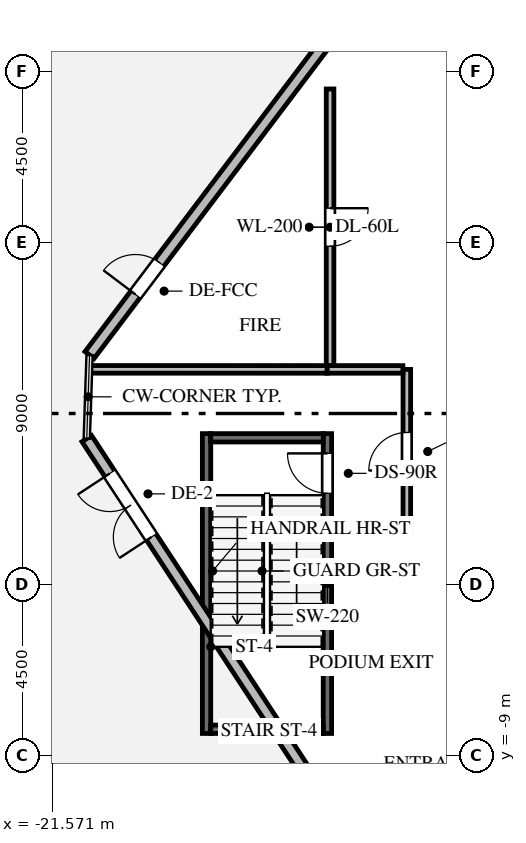
"""IFC4 building model, lengths in metres.
Left out: names, types, materials, properties, quantities, classifications, styles, units other than length and angle.
Written with IfcOpenShell. Run it as: python <this file> out.ifc"""

import sys

from ifc_helpers import new_model, si_unit, direction, frame, frame_2d, origin, place, context, subcontext, project, spatial, rectangle, extrude, source, transform, mapped, element, fill, save


model = new_model("IFC4")
c1 = context("Model", 3, precision=1e-05, world=origin(), true_north=direction((0.0, 1.0)))
c2 = subcontext(c1, "Body", "Model", "MODEL_VIEW")
j1 = project(units=[si_unit("LENGTHUNIT", "METRE"), si_unit("PLANEANGLEUNIT", "RADIAN")], contexts=[c1])
p1 = place(None, origin())
s1 = spatial("IfcSite", under=j1, at=p1, CompositionType="ELEMENT")
p2 = place(p1, origin())
s2 = spatial("IfcBuilding", under=s1, at=p2, CompositionType="ELEMENT")
p3 = place(p2, origin())
s3 = spatial("IfcBuildingStorey", under=s2, at=p3, CompositionType="ELEMENT", Elevation=0.0)
p4 = place(p3, frame((-14.33, -8.42, -0.3), z_axis=(0.0, 0.0, 1.0), x_axis=(0.0, 1.0, 0.0)))
e1 = element("IfcWall", 1, at=p4, inside=s3, PredefinedType="SHEAR", context=c2, shape_type="SweptSolid", body=[
    extrude(rectangle(XDim=7.89, YDim=0.22, at=frame_2d((3.945, 0.0))), origin(), (0.0, 0.0, 1.0), 5.2),
])
p5 = place(p4, frame((6.32, 0.0, 0.0)))
e2 = element("IfcOpeningElement", 2, at=p5, cuts=e1, PredefinedType="OPENING", context=c2, shape_type="SweptSolid", body=[
    extrude(rectangle(XDim=1.05, YDim=2.15, at=frame_2d((0.525, 1.075))), frame((0.0, 0.12, 0.0), z_axis=(0.0, -1.0, 0.0), x_axis=(1.0, 0.0, 0.0)), (0.0, 0.0, 1.0), 0.24),
])
p6 = place(p3, frame((-17.51, -0.53, -0.3), z_axis=(0.0, 0.0, 1.0), x_axis=(0.0, -1.0, 0.0)))
e3 = element("IfcWall", 3, at=p6, inside=s3, PredefinedType="SHEAR", context=c2, shape_type="SweptSolid", body=[
    extrude(rectangle(XDim=7.89, YDim=0.22, at=frame_2d((3.945, 0.0))), origin(), (0.0, 0.0, 1.0), 5.2),
])
for number, where, z_axis, x_axis in (
    (4, (-17.4, -8.31, -0.3), (0.0, 0.0, 1.0), (1.0, 0.0, 0.0)),
    (5, (-14.44, -0.64, -0.3), (0.0, 0.0, 1.0), (-1.0, 0.0, 0.0)),
):
    element("IfcWall", number, at=place(p3, frame(where, z_axis=z_axis, x_axis=x_axis)), inside=s3, PredefinedType="SHEAR", context=c2, shape_type="SweptSolid", body=[
        extrude(rectangle(XDim=2.96, YDim=0.22, at=frame_2d((1.48, 0.0))), origin(), (0.0, 0.0, 1.0), 5.2),
    ])
p7 = place(p3, frame((-20.589, 1.538, 0.0), z_axis=(0.0, 0.0, 1.0), x_axis=(0.603015201292, 0.797729695455, 0.0)))
e6 = element("IfcWall", 6, at=p7, inside=s3, PredefinedType="SOLIDWALL", context=c2, shape_type="SweptSolid", body=[
    extrude(rectangle(XDim=16.65, YDim=0.3, at=frame_2d((8.325, 0.0))), origin(), (0.0, 0.0, 1.0), 4.9),
])
p8 = place(p7, frame((2.0, 0.0, 0.0)))
e7 = element("IfcOpeningElement", 7, at=p8, cuts=e6, PredefinedType="OPENING", context=c2, shape_type="SweptSolid", body=[
    extrude(rectangle(XDim=1.05, YDim=2.2, at=frame_2d((0.525, 1.1))), frame((0.0, 0.16, 0.0), z_axis=(0.0, -1.0, 0.0), x_axis=(1.0, 0.0, 0.0)), (0.0, 0.0, 1.0), 0.32),
])
p9 = place(p3, frame((-11.422, -14.754, 0.0), z_axis=(0.0, 0.0, 1.0), x_axis=(-0.548298501614, 0.836282699288, 0.0)))
e8 = element("IfcWall", 8, at=p9, inside=s3, PredefinedType="SOLIDWALL", context=c2, shape_type="SweptSolid", body=[
    extrude(rectangle(XDim=16.853, YDim=0.3, at=frame_2d((8.426, 0.0))), origin(), (0.0, 0.0, 1.0), 4.9),
])
p10 = place(p9, frame((13.753, 0.0, 0.0)))
e9 = element("IfcOpeningElement", 9, at=p10, cuts=e8, PredefinedType="OPENING", context=c2, shape_type="SweptSolid", body=[
    extrude(rectangle(XDim=2.0, YDim=2.3, at=frame_2d((1.0, 1.15))), frame((0.0, 0.16, 0.0), z_axis=(0.0, -1.0, 0.0), x_axis=(1.0, 0.0, 0.0)), (0.0, 0.0, 1.0), 0.32),
])
p11 = place(p3, frame((-12.24, -3.16, 0.0), z_axis=(0.0, 0.0, 1.0), x_axis=(0.0, 1.0, 0.0)))
e10 = element("IfcWall", 10, at=p11, inside=s3, PredefinedType="SOLIDWALL", context=c2, shape_type="SweptSolid", body=[
    extrude(rectangle(XDim=4.32, YDim=0.2, at=frame_2d((2.16, 0.0))), origin(), (0.0, 0.0, 1.0), 4.885),
])
p12 = place(p11, frame((1.66, 0.0, 0.0)))
e11 = element("IfcOpeningElement", 11, at=p12, cuts=e10, PredefinedType="OPENING", context=c2, shape_type="SweptSolid", body=[
    extrude(rectangle(XDim=1.0, YDim=2.15, at=frame_2d((0.5, 1.075))), frame((0.0, 0.11, 0.0), z_axis=(0.0, -1.0, 0.0), x_axis=(1.0, 0.0, 0.0)), (0.0, 0.0, 1.0), 0.22),
])
p13 = place(p3, frame((-12.344, 1.16, 0.0), z_axis=(0.0, 0.0, 1.0), x_axis=(-1.0, 0.0, 0.0)))
e12 = element("IfcWall", 12, at=p13, inside=s3, PredefinedType="SOLIDWALL", context=c2, shape_type="SweptSolid", body=[
    extrude(rectangle(XDim=1.996, YDim=0.2, at=frame_2d((0.998, 0.0))), origin(), (0.0, 0.0, 1.0), 4.885),
])
p14 = place(p3, frame((-14.215, -3.16, 0.0), z_axis=(0.0, 0.0, 1.0), x_axis=(1.0, 0.0, 0.0)))
e13 = element("IfcWall", 13, at=p14, inside=s3, PredefinedType="SOLIDWALL", context=c2, shape_type="SweptSolid", body=[
    extrude(rectangle(XDim=1.871, YDim=0.2, at=frame_2d((0.936, 0.0))), origin(), (0.0, 0.0, 1.0), 4.885),
])
p15 = place(p3, frame((-14.26, 8.54, 0.0), z_axis=(0.0, 0.0, 1.0), x_axis=(0.0, -1.0, 0.0)))
e14 = element("IfcWall", 14, at=p15, inside=s3, PredefinedType="SOLIDWALL", context=c2, shape_type="SweptSolid", body=[
    extrude(rectangle(XDim=7.276, YDim=0.2, at=frame_2d((3.638, 0.0))), origin(), (0.0, 0.0, 1.0), 3.807),
])
p16 = place(p15, frame((3.138, 0.0, 0.0)))
e15 = element("IfcOpeningElement", 15, at=p16, cuts=e14, PredefinedType="OPENING", context=c2, shape_type="SweptSolid", body=[
    extrude(rectangle(XDim=1.0, YDim=2.15, at=frame_2d((0.5, 1.075))), frame((0.0, 0.11, 0.0), z_axis=(0.0, -1.0, 0.0), x_axis=(1.0, 0.0, 0.0)), (0.0, 0.0, 1.0), 0.22),
])
p17 = place(p3, frame((-14.34, 1.16, 0.0), z_axis=(0.0, 0.0, 1.0), x_axis=(-0.999999972633, 0.000233954606, 0.0)))
e16 = element("IfcWall", 16, at=p17, inside=s3, PredefinedType="SOLIDWALL", context=c2, shape_type="SweptSolid", body=[
    extrude(rectangle(XDim=6.261, YDim=0.2, at=frame_2d((3.131, 0.0))), origin(), (0.0, 0.0, 1.0), 3.807),
])
m1 = source(origin(), c2, "Body", "SweptSolid", [
    extrude(rectangle(XDim=1.05, YDim=2.2, at=frame_2d((0.525, 1.1))), frame((0.0, 0.025, 0.0), z_axis=(0.0, -1.0, 0.0), x_axis=(1.0, 0.0, 0.0)), (0.0, 0.0, 1.0), 0.05),
])
p18 = place(p8, origin())
e17 = element("IfcDoor", 17, at=p18, inside=s3, OperationType="SINGLE_SWING_LEFT", PredefinedType="DOOR", context=c2, shape_type="MappedRepresentation", body=[
    mapped(m1, transform((0.0, 0.0, 0.0), x_axis=(1.0, 0.0, 0.0), y_axis=(0.0, 1.0, 0.0), z_axis=(0.0, 0.0, 1.0), scale=1.0)),
])
fill(e7, e17)
m2 = source(origin(), c2, "Body", "SweptSolid", [
    extrude(rectangle(XDim=2.0, YDim=2.3, at=frame_2d((1.0, 1.15))), frame((0.0, 0.025, 0.0), z_axis=(0.0, -1.0, 0.0), x_axis=(1.0, 0.0, 0.0)), (0.0, 0.0, 1.0), 0.05),
])
p19 = place(p10, origin())
e18 = element("IfcDoor", 18, at=p19, inside=s3, OperationType="DOUBLE_DOOR_SINGLE_SWING", PredefinedType="DOOR", context=c2, shape_type="MappedRepresentation", body=[
    mapped(m2, transform((0.0, 0.0, 0.0), x_axis=(1.0, 0.0, 0.0), y_axis=(0.0, 1.0, 0.0), z_axis=(0.0, 0.0, 1.0), scale=1.0)),
])
fill(e9, e18)
m3 = source(origin(), c2, "Body", "SweptSolid", [
    extrude(rectangle(XDim=1.05, YDim=2.15, at=frame_2d((0.525, 1.075))), frame((0.0, 0.025, 0.0), z_axis=(0.0, -1.0, 0.0), x_axis=(1.0, 0.0, 0.0)), (0.0, 0.0, 1.0), 0.05),
])
p20 = place(p5, origin())
e19 = element("IfcDoor", 19, at=p20, inside=s3, OperationType="SINGLE_SWING_RIGHT", PredefinedType="DOOR", context=c2, shape_type="MappedRepresentation", body=[
    mapped(m3, transform((0.0, 0.0, 0.0), x_axis=(1.0, 0.0, 0.0), y_axis=(0.0, 1.0, 0.0), z_axis=(0.0, 0.0, 1.0), scale=1.0)),
])
fill(e2, e19)
m4 = source(origin(), c2, "Body", "SweptSolid", [
    extrude(rectangle(XDim=1.0, YDim=2.15, at=frame_2d((0.5, 1.075))), frame((0.0, 0.025, 0.0), z_axis=(0.0, -1.0, 0.0), x_axis=(1.0, 0.0, 0.0)), (0.0, 0.0, 1.0), 0.05),
])
p21 = place(p12, origin())
e20 = element("IfcDoor", 20, at=p21, inside=s3, OperationType="SINGLE_SWING_LEFT", PredefinedType="DOOR", context=c2, shape_type="MappedRepresentation", body=[
    mapped(m4, transform((0.0, 0.0, 0.0), x_axis=(1.0, 0.0, 0.0), y_axis=(0.0, 1.0, 0.0), z_axis=(0.0, 0.0, 1.0), scale=1.0)),
])
fill(e11, e20)
p22 = place(p16, origin())
e21 = element("IfcDoor", 21, at=p22, inside=s3, OperationType="SINGLE_SWING_LEFT", PredefinedType="DOOR", context=c2, shape_type="MappedRepresentation", body=[
    mapped(m4, transform((0.0, 0.0, 0.0), x_axis=(1.0, 0.0, 0.0), y_axis=(0.0, 1.0, 0.0), z_axis=(0.0, 0.0, 1.0), scale=1.0)),
])
fill(e15, e21)
save(model, sys.argv[1])
